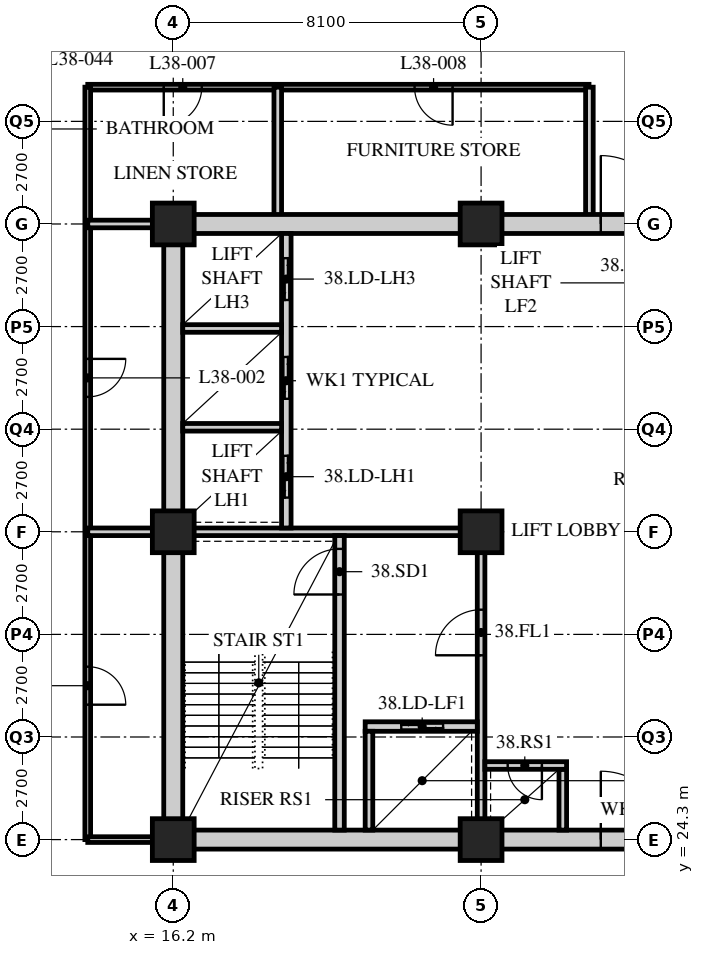
"""IFC4 building model, lengths in metres.
Left out: names, types, materials, properties, quantities, classifications, styles, units other than length and angle.
Written with IfcOpenShell. Run it as: python <this file> out.ifc"""

import sys

from ifc_helpers import new_model, si_unit, direction, frame, frame_2d, origin, origin_2d, place, context, subcontext, project, spatial, rectangle, hollow_rectangle, extrude, element, fill, save


model = new_model("IFC4")
c1 = context("Model", 3, precision=1e-05, world=origin(), true_north=direction((0.0, 1.0)))
c2 = subcontext(c1, "Body", "Model", "MODEL_VIEW")
j1 = project(units=[si_unit("LENGTHUNIT", "METRE"), si_unit("PLANEANGLEUNIT", "RADIAN")], contexts=[c1])
p1 = place(None, origin())
s1 = spatial("IfcSite", under=j1, at=p1, CompositionType="ELEMENT")
p2 = place(p1, origin())
s2 = spatial("IfcBuilding", under=s1, at=p2, CompositionType="ELEMENT")
p3 = place(p2, frame((0.0, 0.0, 147.6)))
s3 = spatial("IfcBuildingStorey", under=s2, at=p3, CompositionType="ELEMENT", Elevation=147.6)
for number, where, z_axis, x_axis in (
    (1, (16.2, 24.3, 0.0), (0.0, 0.0, 1.0), (1.0, 0.0, 0.0)),
    (2, (16.2, 32.4, 0.0), (0.0, 0.0, 1.0), (1.0, 0.0, 0.0)),
    (3, (16.2, 40.5, 0.0), (0.0, 0.0, 1.0), (1.0, 0.0, 0.0)),
    (4, (24.3, 24.3, 0.0), (0.0, 0.0, 1.0), (1.0, 0.0, 0.0)),
    (5, (24.3, 32.4, 0.0), (0.0, 0.0, 1.0), (1.0, 0.0, 0.0)),
    (6, (24.3, 40.5, 0.0), (0.0, 0.0, 1.0), (1.0, 0.0, 0.0)),
):
    element("IfcColumn", number, at=place(p3, frame(where, z_axis=z_axis, x_axis=x_axis)), inside=s3, PredefinedType="COLUMN", context=c2, shape_type="SweptSolid", body=[
        extrude(hollow_rectangle(XDim=1.1, YDim=1.1, WallThickness=0.1, at=origin_2d()), origin(), (0.0, 0.0, 1.0), 3.4),
    ])
p4 = place(p3, frame((27.14, 44.1, 0.0), z_axis=(0.0, 0.0, 1.0), x_axis=(-1.0, 0.0, 0.0)))
e7 = element("IfcWall", 7, at=p4, inside=s3, PredefinedType="PARTITIONING", context=c2, shape_type="SweptSolid", body=[
    extrude(rectangle(XDim=13.19, YDim=0.15, at=frame_2d((6.595, 0.0))), origin(), (0.0, 0.0, 1.0), 3.19),
])
p5 = place(p4, frame((10.19, 0.0, 0.0)))
e8 = element("IfcOpeningElement", 8, at=p5, cuts=e7, PredefinedType="OPENING", context=c2, shape_type="SweptSolid", body=[
    extrude(rectangle(XDim=1.0, YDim=2.1, at=frame_2d((0.5, 1.05))), frame((0.0, 0.085, 0.0), z_axis=(0.0, -1.0, 0.0), x_axis=(1.0, 0.0, 0.0)), (0.0, 0.0, 1.0), 0.17),
])
p6 = place(p4, frame((3.59, 0.0, 0.0)))
e9 = element("IfcOpeningElement", 9, at=p6, cuts=e7, PredefinedType="OPENING", context=c2, shape_type="SweptSolid", body=[
    extrude(rectangle(XDim=1.0, YDim=2.1, at=frame_2d((0.5, 1.05))), frame((0.0, 0.085, 0.0), z_axis=(0.0, -1.0, 0.0), x_axis=(1.0, 0.0, 0.0)), (0.0, 0.0, 1.0), 0.17),
])
p7 = place(p3, frame((13.95, 44.1, 0.0), z_axis=(0.0, 0.0, 1.0), x_axis=(0.0, -1.0, 0.0)))
e10 = element("IfcWall", 10, at=p7, inside=s3, PredefinedType="PARTITIONING", context=c2, shape_type="SweptSolid", body=[
    extrude(rectangle(XDim=19.8, YDim=0.15, at=frame_2d((9.9, 0.0))), origin(), (0.0, 0.0, 1.0), 3.19),
])
p8 = place(p7, frame((15.25, 0.0, 0.0)))
e11 = element("IfcOpeningElement", 11, at=p8, cuts=e10, PredefinedType="OPENING", context=c2, shape_type="SweptSolid", body=[
    extrude(rectangle(XDim=1.0, YDim=2.1, at=frame_2d((0.5, 1.05))), frame((0.0, 0.085, 0.0), z_axis=(0.0, -1.0, 0.0), x_axis=(1.0, 0.0, 0.0)), (0.0, 0.0, 1.0), 0.17),
])
p9 = place(p7, frame((7.15, 0.0, 0.0)))
e12 = element("IfcOpeningElement", 12, at=p9, cuts=e10, PredefinedType="OPENING", context=c2, shape_type="SweptSolid", body=[
    extrude(rectangle(XDim=1.0, YDim=2.1, at=frame_2d((0.5, 1.05))), frame((0.0, 0.085, 0.0), z_axis=(0.0, -1.0, 0.0), x_axis=(1.0, 0.0, 0.0)), (0.0, 0.0, 1.0), 0.17),
])
p10 = place(p3, frame((13.95, 24.3, 0.0), z_axis=(0.0, 0.0, 1.0), x_axis=(1.0, 0.0, 0.0)))
e13 = element("IfcWall", 13, at=p10, inside=s3, PredefinedType="PARTITIONING", context=c2, shape_type="SweptSolid", body=[
    extrude(rectangle(XDim=2.05, YDim=0.15, at=frame_2d((1.025, 0.0))), origin(), (0.0, 0.0, 1.0), 3.19),
])
p11 = place(p3, frame((13.95, 32.4, 0.0), z_axis=(0.0, 0.0, 1.0), x_axis=(1.0, 0.0, 0.0)))
e14 = element("IfcWall", 14, at=p11, inside=s3, PredefinedType="SOLIDWALL", context=c2, shape_type="SweptSolid", body=[
    extrude(rectangle(XDim=2.25, YDim=0.2, at=frame_2d((1.125, 0.0))), origin(), (0.0, 0.0, 1.0), 3.19),
])
for number, where, z_axis, x_axis in (
    (15, (18.95, 44.1, 0.0), (0.0, 0.0, 1.0), (0.0, -1.0, 0.0)),
    (16, (27.15, 40.5, 0.0), (0.0, 0.0, 1.0), (0.0, 1.0, 0.0)),
):
    element("IfcWall", number, at=place(p3, frame(where, z_axis=z_axis, x_axis=x_axis)), inside=s3, PredefinedType="SOLIDWALL", context=c2, shape_type="SweptSolid", body=[
        extrude(rectangle(XDim=3.6, YDim=0.2, at=frame_2d((1.8, 0.0))), origin(), (0.0, 0.0, 1.0), 3.19),
    ])
p12 = place(p3, frame((13.95, 40.5, 0.0), z_axis=(0.0, 0.0, 1.0), x_axis=(1.0, 0.0, 0.0)))
e17 = element("IfcWall", 17, at=p12, inside=s3, PredefinedType="SOLIDWALL", context=c2, shape_type="SweptSolid", body=[
    extrude(rectangle(XDim=2.25, YDim=0.2, at=frame_2d((1.125, 0.0))), origin(), (0.0, 0.0, 1.0), 3.19),
])
p13 = place(p3, frame((15.95, 24.3, 0.0), z_axis=(0.0, 0.0, 1.0), x_axis=(1.0, 0.0, 0.0)))
e18 = element("IfcWall", 18, at=p13, inside=s3, PredefinedType="SOLIDWALL", context=c2, shape_type="SweptSolid", body=[
    extrude(rectangle(XDim=24.8, YDim=0.5, at=frame_2d((12.4, 0.0))), origin(), (0.0, 0.0, 1.0), 2.42),
])
p14 = place(p13, frame((11.5, 0.0, 0.0)))
e19 = element("IfcOpeningElement", 19, at=p14, cuts=e18, PredefinedType="OPENING", context=c2, shape_type="SweptSolid", body=[
    extrude(rectangle(XDim=1.8, YDim=2.4, at=frame_2d((0.9, 1.2))), frame((0.0, 0.26, 0.0), z_axis=(0.0, -1.0, 0.0), x_axis=(1.0, 0.0, 0.0)), (0.0, 0.0, 1.0), 0.52),
])
p15 = place(p3, frame((15.95, 40.5, 0.0), z_axis=(0.0, 0.0, 1.0), x_axis=(1.0, 0.0, 0.0)))
e20 = element("IfcWall", 20, at=p15, inside=s3, PredefinedType="SOLIDWALL", context=c2, shape_type="SweptSolid", body=[
    extrude(rectangle(XDim=24.8, YDim=0.5, at=frame_2d((12.4, 0.0))), origin(), (0.0, 0.0, 1.0), 2.42),
])
p16 = place(p15, frame((11.5, 0.0, 0.0)))
e21 = element("IfcOpeningElement", 21, at=p16, cuts=e20, PredefinedType="OPENING", context=c2, shape_type="SweptSolid", body=[
    extrude(rectangle(XDim=1.8, YDim=2.4, at=frame_2d((0.9, 1.2))), frame((0.0, 0.26, 0.0), z_axis=(0.0, -1.0, 0.0), x_axis=(1.0, 0.0, 0.0)), (0.0, 0.0, 1.0), 0.52),
])
p17 = place(p3, frame((16.2, 24.55, 0.0), z_axis=(0.0, 0.0, 1.0), x_axis=(0.0, 1.0, 0.0)))
e22 = element("IfcWall", 22, at=p17, inside=s3, PredefinedType="SOLIDWALL", context=c2, shape_type="SweptSolid", body=[
    extrude(rectangle(XDim=15.7, YDim=0.5, at=frame_2d((7.85, 0.0))), origin(), (0.0, 0.0, 1.0), 2.42),
])
p18 = place(p3, frame((16.45, 32.4, 0.0), z_axis=(0.0, 0.0, 1.0), x_axis=(1.0, 0.0, 0.0)))
e23 = element("IfcWall", 23, at=p18, inside=s3, PredefinedType="SOLIDWALL", context=c2, shape_type="SweptSolid", body=[
    extrude(rectangle(XDim=7.95, YDim=0.2, at=frame_2d((3.975, 0.0))), origin(), (0.0, 0.0, 1.0), 2.578),
])
p19 = place(p3, frame((24.3, 24.55, 0.0), z_axis=(0.0, 0.0, 1.0), x_axis=(0.0, 1.0, 0.0)))
e24 = element("IfcWall", 24, at=p19, inside=s3, PredefinedType="SOLIDWALL", context=c2, shape_type="SweptSolid", body=[
    extrude(rectangle(XDim=7.75, YDim=0.2, at=frame_2d((3.875, 0.0))), origin(), (0.0, 0.0, 1.0), 2.578),
])
p20 = place(p19, frame((4.6, 0.0, 0.0)))
e25 = element("IfcOpeningElement", 25, at=p20, cuts=e24, PredefinedType="OPENING", context=c2, shape_type="SweptSolid", body=[
    extrude(rectangle(XDim=1.2, YDim=2.1, at=frame_2d((0.6, 1.05))), frame((0.0, 0.11, 0.0), z_axis=(0.0, -1.0, 0.0), x_axis=(1.0, 0.0, 0.0)), (0.0, 0.0, 1.0), 0.22),
])
p21 = place(p3, frame((20.575, 24.55, 0.0), z_axis=(0.0, 0.0, 1.0), x_axis=(0.0, 1.0, 0.0)))
e26 = element("IfcWall", 26, at=p21, inside=s3, PredefinedType="SOLIDWALL", context=c2, shape_type="SweptSolid", body=[
    extrude(rectangle(XDim=7.75, YDim=0.25, at=frame_2d((3.875, 0.0))), origin(), (0.0, 0.0, 1.0), 3.19),
])
p22 = place(p21, frame((6.2, 0.0, 0.0)))
e27 = element("IfcOpeningElement", 27, at=p22, cuts=e26, PredefinedType="OPENING", context=c2, shape_type="SweptSolid", body=[
    extrude(rectangle(XDim=1.2, YDim=2.1, at=frame_2d((0.6, 1.05))), frame((0.0, 0.135, 0.0), z_axis=(0.0, -1.0, 0.0), x_axis=(1.0, 0.0, 0.0)), (0.0, 0.0, 1.0), 0.27),
])
p23 = place(p3, frame((21.25, 27.275, 0.0), z_axis=(0.0, 0.0, 1.0), x_axis=(1.0, 0.0, 0.0)))
e28 = element("IfcWall", 28, at=p23, inside=s3, PredefinedType="SOLIDWALL", context=c2, shape_type="SweptSolid", body=[
    extrude(rectangle(XDim=2.95, YDim=0.25, at=frame_2d((1.475, 0.0))), origin(), (0.0, 0.0, 1.0), 3.19),
])
p24 = place(p23, frame((0.95, 0.0, 0.0)))
e29 = element("IfcOpeningElement", 29, at=p24, cuts=e28, PredefinedType="OPENING", context=c2, shape_type="SweptSolid", body=[
    extrude(rectangle(XDim=1.1, YDim=2.4, at=frame_2d((0.55, 1.2))), frame((0.0, 0.135, 0.0), z_axis=(0.0, -1.0, 0.0), x_axis=(1.0, 0.0, 0.0)), (0.0, 0.0, 1.0), 0.27),
])
p25 = place(p3, frame((21.35, 24.55, 0.0), z_axis=(0.0, 0.0, 1.0), x_axis=(0.0, 1.0, 0.0)))
e30 = element("IfcWall", 30, at=p25, inside=s3, PredefinedType="SOLIDWALL", context=c2, shape_type="SweptSolid", body=[
    extrude(rectangle(XDim=2.6, YDim=0.2, at=frame_2d((1.3, 0.0))), origin(), (0.0, 0.0, 1.0), 3.19),
])
p26 = place(p3, frame((19.175, 32.5, 0.0), z_axis=(0.0, 0.0, 1.0), x_axis=(0.0, 1.0, 0.0)))
e31 = element("IfcWall", 31, at=p26, inside=s3, PredefinedType="SOLIDWALL", context=c2, shape_type="SweptSolid", body=[
    extrude(rectangle(XDim=7.75, YDim=0.25, at=frame_2d((3.875, 0.0))), origin(), (0.0, 0.0, 1.0), 3.19),
])
p27 = place(p26, frame((0.8, 0.0, 0.0)))
e32 = element("IfcOpeningElement", 32, at=p27, cuts=e31, PredefinedType="OPENING", context=c2, shape_type="SweptSolid", body=[
    extrude(rectangle(XDim=1.1, YDim=2.4, at=frame_2d((0.55, 1.2))), frame((0.0, 0.135, 0.0), z_axis=(0.0, -1.0, 0.0), x_axis=(1.0, 0.0, 0.0)), (0.0, 0.0, 1.0), 0.27),
])
p28 = place(p26, frame((3.4, 0.0, 0.0)))
e33 = element("IfcOpeningElement", 33, at=p28, cuts=e31, PredefinedType="OPENING", context=c2, shape_type="SweptSolid", body=[
    extrude(rectangle(XDim=1.1, YDim=2.4, at=frame_2d((0.55, 1.2))), frame((0.0, 0.135, 0.0), z_axis=(0.0, -1.0, 0.0), x_axis=(1.0, 0.0, 0.0)), (0.0, 0.0, 1.0), 0.27),
])
p29 = place(p26, frame((6.0, 0.0, 0.0)))
e34 = element("IfcOpeningElement", 34, at=p29, cuts=e31, PredefinedType="OPENING", context=c2, shape_type="SweptSolid", body=[
    extrude(rectangle(XDim=1.1, YDim=2.4, at=frame_2d((0.55, 1.2))), frame((0.0, 0.135, 0.0), z_axis=(0.0, -1.0, 0.0), x_axis=(1.0, 0.0, 0.0)), (0.0, 0.0, 1.0), 0.27),
])
for number, where, z_axis, x_axis in (
    (35, (16.45, 35.15, 0.0), (0.0, 0.0, 1.0), (1.0, 0.0, 0.0)),
    (36, (16.45, 37.75, 0.0), (0.0, 0.0, 1.0), (1.0, 0.0, 0.0)),
):
    element("IfcWall", number, at=place(p3, frame(where, z_axis=z_axis, x_axis=x_axis)), inside=s3, PredefinedType="SOLIDWALL", context=c2, shape_type="SweptSolid", body=[
        extrude(rectangle(XDim=2.6, YDim=0.2, at=frame_2d((1.3, 0.0))), origin(), (0.0, 0.0, 1.0), 3.19),
    ])
p30 = place(p3, frame((26.45, 24.55, 0.0), z_axis=(0.0, 0.0, 1.0), x_axis=(0.0, 1.0, 0.0)))
e37 = element("IfcWall", 37, at=p30, inside=s3, PredefinedType="SOLIDWALL", context=c2, shape_type="SweptSolid", body=[
    extrude(rectangle(XDim=1.6, YDim=0.2, at=frame_2d((0.8, 0.0))), origin(), (0.0, 0.0, 1.0), 3.19),
])
p31 = place(p3, frame((24.4, 26.25, 0.0), z_axis=(0.0, 0.0, 1.0), x_axis=(1.0, 0.0, 0.0)))
e38 = element("IfcWall", 38, at=p31, inside=s3, PredefinedType="SOLIDWALL", context=c2, shape_type="SweptSolid", body=[
    extrude(rectangle(XDim=2.15, YDim=0.2, at=frame_2d((1.075, 0.0))), origin(), (0.0, 0.0, 1.0), 3.19),
])
p32 = place(p31, frame((0.6, 0.0, 0.0)))
e39 = element("IfcOpeningElement", 39, at=p32, cuts=e38, PredefinedType="OPENING", context=c2, shape_type="SweptSolid", body=[
    extrude(rectangle(XDim=0.9, YDim=2.1, at=frame_2d((0.45, 1.05))), frame((0.0, 0.11, 0.0), z_axis=(0.0, -1.0, 0.0), x_axis=(1.0, 0.0, 0.0)), (0.0, 0.0, 1.0), 0.22),
])
p33 = place(p8, origin())
e40 = element("IfcDoor", 40, at=p33, inside=s3, OperationType="SINGLE_SWING_RIGHT", PredefinedType="DOOR", context=c2, shape_type="SweptSolid", body=[
    extrude(rectangle(XDim=1.0, YDim=2.1, at=frame_2d((0.5, 1.05))), frame((0.0, 0.025, 0.0), z_axis=(0.0, -1.0, 0.0), x_axis=(1.0, 0.0, 0.0)), (0.0, 0.0, 1.0), 0.05),
])
fill(e11, e40)
p34 = place(p9, origin())
e41 = element("IfcDoor", 41, at=p34, inside=s3, OperationType="SINGLE_SWING_LEFT", PredefinedType="DOOR", context=c2, shape_type="SweptSolid", body=[
    extrude(rectangle(XDim=1.0, YDim=2.1, at=frame_2d((0.5, 1.05))), frame((0.0, 0.025, 0.0), z_axis=(0.0, -1.0, 0.0), x_axis=(1.0, 0.0, 0.0)), (0.0, 0.0, 1.0), 0.05),
])
fill(e12, e41)
p35 = place(p5, origin())
e42 = element("IfcDoor", 42, at=p35, inside=s3, OperationType="SINGLE_SWING_RIGHT", PredefinedType="DOOR", context=c2, shape_type="SweptSolid", body=[
    extrude(rectangle(XDim=1.0, YDim=2.1, at=frame_2d((0.5, 1.05))), frame((0.0, 0.025, 0.0), z_axis=(0.0, -1.0, 0.0), x_axis=(1.0, 0.0, 0.0)), (0.0, 0.0, 1.0), 0.05),
])
fill(e8, e42)
p36 = place(p6, origin())
e43 = element("IfcDoor", 43, at=p36, inside=s3, OperationType="SINGLE_SWING_LEFT", PredefinedType="DOOR", context=c2, shape_type="SweptSolid", body=[
    extrude(rectangle(XDim=1.0, YDim=2.1, at=frame_2d((0.5, 1.05))), frame((0.0, 0.025, 0.0), z_axis=(0.0, -1.0, 0.0), x_axis=(1.0, 0.0, 0.0)), (0.0, 0.0, 1.0), 0.05),
])
fill(e9, e43)
p37 = place(p22, origin())
e44 = element("IfcDoor", 44, at=p37, inside=s3, OperationType="SINGLE_SWING_LEFT", PredefinedType="DOOR", context=c2, shape_type="SweptSolid", body=[
    extrude(rectangle(XDim=1.2, YDim=2.1, at=frame_2d((0.6, 1.05))), frame((0.0, 0.025, 0.0), z_axis=(0.0, -1.0, 0.0), x_axis=(1.0, 0.0, 0.0)), (0.0, 0.0, 1.0), 0.05),
])
fill(e27, e44)
p38 = place(p20, origin())
e45 = element("IfcDoor", 45, at=p38, inside=s3, OperationType="SINGLE_SWING_LEFT", PredefinedType="DOOR", context=c2, shape_type="SweptSolid", body=[
    extrude(rectangle(XDim=1.2, YDim=2.1, at=frame_2d((0.6, 1.05))), frame((0.0, 0.025, 0.0), z_axis=(0.0, -1.0, 0.0), x_axis=(1.0, 0.0, 0.0)), (0.0, 0.0, 1.0), 0.05),
])
fill(e25, e45)
p39 = place(p32, origin())
e46 = element("IfcDoor", 46, at=p39, inside=s3, OperationType="SINGLE_SWING_LEFT", PredefinedType="DOOR", context=c2, shape_type="SweptSolid", body=[
    extrude(rectangle(XDim=0.9, YDim=2.1, at=frame_2d((0.45, 1.05))), frame((0.0, 0.025, 0.0), z_axis=(0.0, -1.0, 0.0), x_axis=(1.0, 0.0, 0.0)), (0.0, 0.0, 1.0), 0.05),
])
fill(e39, e46)
p40 = place(p27, origin())
e47 = element("IfcDoor", 47, at=p40, inside=s3, OperationType="DOUBLE_DOOR_SLIDING", PredefinedType="DOOR", context=c2, shape_type="SweptSolid", body=[
    extrude(rectangle(XDim=1.1, YDim=2.4, at=frame_2d((0.55, 1.2))), frame((0.0, 0.025, 0.0), z_axis=(0.0, -1.0, 0.0), x_axis=(1.0, 0.0, 0.0)), (0.0, 0.0, 1.0), 0.05),
])
fill(e32, e47)
p41 = place(p28, origin())
e48 = element("IfcDoor", 48, at=p41, inside=s3, OperationType="DOUBLE_DOOR_SLIDING", PredefinedType="DOOR", context=c2, shape_type="SweptSolid", body=[
    extrude(rectangle(XDim=1.1, YDim=2.4, at=frame_2d((0.55, 1.2))), frame((0.0, 0.025, 0.0), z_axis=(0.0, -1.0, 0.0), x_axis=(1.0, 0.0, 0.0)), (0.0, 0.0, 1.0), 0.05),
])
fill(e33, e48)
p42 = place(p29, origin())
e49 = element("IfcDoor", 49, at=p42, inside=s3, OperationType="DOUBLE_DOOR_SLIDING", PredefinedType="DOOR", context=c2, shape_type="SweptSolid", body=[
    extrude(rectangle(XDim=1.1, YDim=2.4, at=frame_2d((0.55, 1.2))), frame((0.0, 0.025, 0.0), z_axis=(0.0, -1.0, 0.0), x_axis=(1.0, 0.0, 0.0)), (0.0, 0.0, 1.0), 0.05),
])
fill(e34, e49)
p43 = place(p24, origin())
e50 = element("IfcDoor", 50, at=p43, inside=s3, OperationType="DOUBLE_DOOR_SLIDING", PredefinedType="DOOR", context=c2, shape_type="SweptSolid", body=[
    extrude(rectangle(XDim=1.1, YDim=2.4, at=frame_2d((0.55, 1.2))), frame((0.0, 0.025, 0.0), z_axis=(0.0, -1.0, 0.0), x_axis=(1.0, 0.0, 0.0)), (0.0, 0.0, 1.0), 0.05),
])
fill(e29, e50)
p44 = place(p14, origin())
e51 = element("IfcDoor", 51, at=p44, inside=s3, OperationType="DOUBLE_DOOR_SINGLE_SWING", PredefinedType="DOOR", context=c2, shape_type="SweptSolid", body=[
    extrude(rectangle(XDim=1.8, YDim=2.4, at=frame_2d((0.9, 1.2))), frame((0.0, 0.025, 0.0), z_axis=(0.0, -1.0, 0.0), x_axis=(1.0, 0.0, 0.0)), (0.0, 0.0, 1.0), 0.05),
])
fill(e19, e51)
p45 = place(p16, origin())
e52 = element("IfcDoor", 52, at=p45, inside=s3, OperationType="DOUBLE_DOOR_SINGLE_SWING", PredefinedType="DOOR", context=c2, shape_type="SweptSolid", body=[
    extrude(rectangle(XDim=1.8, YDim=2.4, at=frame_2d((0.9, 1.2))), frame((0.0, 0.025, 0.0), z_axis=(0.0, -1.0, 0.0), x_axis=(1.0, 0.0, 0.0)), (0.0, 0.0, 1.0), 0.05),
])
fill(e21, e52)
save(model, sys.argv[1])
